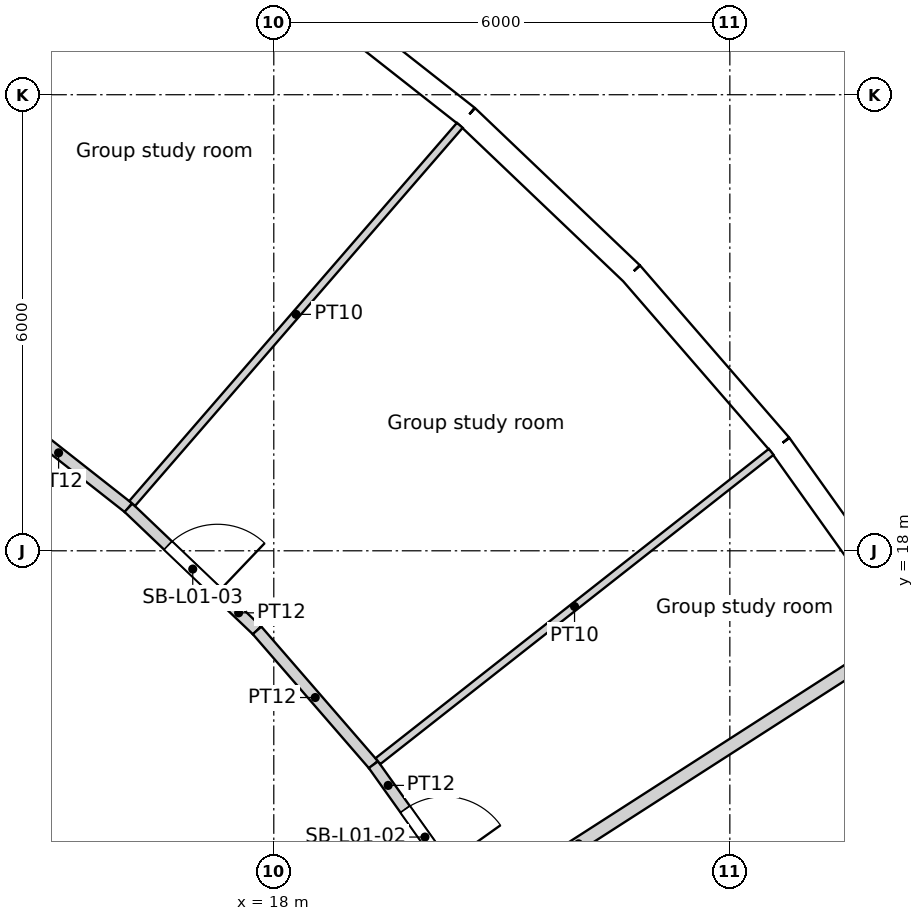
"""IFC4 building model, lengths in metres.
Left out: names, types, materials, properties, quantities, classifications, styles, units other than length and angle.
Written with IfcOpenShell. Run it as: python <this file> out.ifc"""

import sys

from ifc_helpers import new_model, si_unit, direction, frame, frame_2d, origin, origin_2d, place, context, subcontext, project, spatial, rectangle, circle, extrude, element, fill, save


model = new_model("IFC4")
c1 = context("Model", 3, precision=1e-05, world=origin(), true_north=direction((0.0, 1.0)))
c2 = subcontext(c1, "Body", "Model", "MODEL_VIEW")
j1 = project(units=[si_unit("LENGTHUNIT", "METRE"), si_unit("PLANEANGLEUNIT", "RADIAN")], contexts=[c1])
p1 = place(None, origin())
s1 = spatial("IfcSite", under=j1, at=p1, CompositionType="ELEMENT")
p2 = place(p1, origin())
s2 = spatial("IfcBuilding", under=s1, at=p2, CompositionType="ELEMENT")
p3 = place(p2, frame((0.0, 0.0, 9.0)))
s3 = spatial("IfcBuildingStorey", under=s2, at=p3, CompositionType="ELEMENT", Elevation=9.0)
for number, where, z_axis, x_axis in (
    (1, (25.469, 16.368, 0.0), (0.0, 0.0, 1.0), (1.0, 0.0, 0.0)),
    (2, (21.911, 20.892, 0.0), (0.0, 0.0, 1.0), (1.0, 0.0, 0.0)),
    (3, (17.561, 24.661, 0.0), (0.0, 0.0, 1.0), (1.0, 0.0, 0.0)),
):
    element("IfcColumn", number, at=place(p3, frame(where, z_axis=z_axis, x_axis=x_axis)), inside=s3, PredefinedType="COLUMN", context=c2, shape_type="SweptSolid", body=[
        extrude(circle(Radius=0.7, at=origin_2d()), origin(), (0.0, 0.0, 1.0), 4.8),
    ])
for number, where, z_axis, x_axis in (
    (4, (18.805, 15.779, 0.0), (0.0, 0.0, 1.0), (1.0, 0.0, 0.0)),
    (5, (14.659, 19.69, 0.0), (0.0, 0.0, 1.0), (1.0, 0.0, 0.0)),
):
    element("IfcColumn", number, at=place(p3, frame(where, z_axis=z_axis, x_axis=x_axis)), inside=s3, PredefinedType="COLUMN", context=c2, shape_type="SweptSolid", body=[
        extrude(circle(Radius=0.75, at=origin_2d()), origin(), (0.0, 0.0, 1.0), 4.8),
    ])
p4 = place(p3, frame((26.394, 16.962, 0.0), z_axis=(0.0, 0.0, 1.0), x_axis=(-0.580100533892, 0.814544885551, 0.0)))
e6 = element("IfcWall", 6, at=p4, inside=s3, PredefinedType="SOLIDWALL", context=c2, shape_type="SweptSolid", body=[
    extrude(rectangle(XDim=2.986, YDim=0.3, at=frame_2d((1.493, 0.0))), origin(), (0.0, 0.0, 1.0), 4.35),
])
p5 = place(p4, frame((1.493, 0.0, 2.0)))
e7 = element("IfcOpeningElement", 7, at=p5, cuts=e6, PredefinedType="OPENING", context=c2, shape_type="SweptSolid", body=[
    extrude(circle(Radius=1.2, at=origin_2d()), frame((0.0, 0.16, 0.0), z_axis=(0.0, -1.0, 0.0), x_axis=(1.0, 0.0, 0.0)), (0.0, 0.0, 1.0), 0.32),
])
p6 = place(p3, frame((24.662, 19.394, 0.0), z_axis=(0.0, 0.0, 1.0), x_axis=(-0.654809121128, 0.755794294029, 0.0)))
e8 = element("IfcWall", 8, at=p6, inside=s3, PredefinedType="SOLIDWALL", context=c2, shape_type="SweptSolid", body=[
    extrude(rectangle(XDim=2.986, YDim=0.3, at=frame_2d((1.493, 0.0))), origin(), (0.0, 0.0, 1.0), 4.35),
])
p7 = place(p6, frame((1.493, 0.0, 2.0)))
e9 = element("IfcOpeningElement", 9, at=p7, cuts=e8, PredefinedType="OPENING", context=c2, shape_type="SweptSolid", body=[
    extrude(circle(Radius=1.2, at=origin_2d()), frame((0.0, 0.16, 0.0), z_axis=(0.0, -1.0, 0.0), x_axis=(1.0, 0.0, 0.0)), (0.0, 0.0, 1.0), 0.32),
])
p8 = place(p3, frame((22.707, 21.651, 0.0), z_axis=(0.0, 0.0, 1.0), x_axis=(-0.723750841228, 0.690061388444, 0.0)))
e10 = element("IfcWall", 10, at=p8, inside=s3, PredefinedType="SOLIDWALL", context=c2, shape_type="SweptSolid", body=[
    extrude(rectangle(XDim=2.986, YDim=0.3, at=frame_2d((1.493, 0.0))), origin(), (0.0, 0.0, 1.0), 4.35),
])
p9 = place(p8, frame((1.493, 0.0, 2.0)))
e11 = element("IfcOpeningElement", 11, at=p9, cuts=e10, PredefinedType="OPENING", context=c2, shape_type="SweptSolid", body=[
    extrude(circle(Radius=1.2, at=origin_2d()), frame((0.0, 0.16, 0.0), z_axis=(0.0, -1.0, 0.0), x_axis=(1.0, 0.0, 0.0)), (0.0, 0.0, 1.0), 0.32),
])
p10 = place(p3, frame((20.546, 23.711, 0.0), z_axis=(0.0, 0.0, 1.0), x_axis=(-0.786043032847, 0.618171780747, 0.0)))
e12 = element("IfcWall", 12, at=p10, inside=s3, PredefinedType="SOLIDWALL", context=c2, shape_type="SweptSolid", body=[
    extrude(rectangle(XDim=2.986, YDim=0.3, at=frame_2d((1.493, 0.0))), origin(), (0.0, 0.0, 1.0), 4.35),
])
p11 = place(p10, frame((1.493, 0.0, 2.0)))
e13 = element("IfcOpeningElement", 13, at=p11, cuts=e12, PredefinedType="OPENING", context=c2, shape_type="SweptSolid", body=[
    extrude(circle(Radius=1.2, at=origin_2d()), frame((0.0, 0.16, 0.0), z_axis=(0.0, -1.0, 0.0), x_axis=(1.0, 0.0, 0.0)), (0.0, 0.0, 1.0), 0.32),
])
p12 = place(p3, frame((15.612, 27.041, 0.0), z_axis=(0.0, 0.0, 1.0), x_axis=(-0.499994104079, -0.866028807769, 0.0)))
e14 = element("IfcWall", 14, at=p12, inside=s3, PredefinedType="PARTITIONING", context=c2, shape_type="SweptSolid", body=[
    extrude(rectangle(XDim=4.305, YDim=0.1, at=frame_2d((2.152, 0.0))), origin(), (0.0, 0.0, 1.0), 3.75),
])
p13 = place(p3, frame((16.088, 18.566, 0.0), z_axis=(0.0, 0.0, 1.0), x_axis=(-0.786108126536, 0.618089001191, 0.0)))
e15 = element("IfcWall", 15, at=p13, inside=s3, PredefinedType="PARTITIONING", context=c2, shape_type="SweptSolid", body=[
    extrude(rectangle(XDim=2.338, YDim=0.15, at=frame_2d((1.169, 0.0))), origin(), (0.0, 0.0, 1.0), 3.75),
])
p14 = place(p3, frame((16.088, 18.566, 0.0), z_axis=(0.0, 0.0, 1.0), x_axis=(0.723668407542, -0.690147836283, 0.0)))
e16 = element("IfcWall", 16, at=p14, inside=s3, PredefinedType="PARTITIONING", context=c2, shape_type="SweptSolid", body=[
    extrude(rectangle(XDim=2.338, YDim=0.15, at=frame_2d((1.169, 0.0))), origin(), (0.0, 0.0, 1.0), 3.75),
])
p15 = place(p14, frame((0.719, 0.0, 0.0)))
e17 = element("IfcOpeningElement", 17, at=p15, cuts=e16, PredefinedType="OPENING", context=c2, shape_type="SweptSolid", body=[
    extrude(rectangle(XDim=0.9, YDim=2.1, at=frame_2d((0.45, 1.05))), frame((0.0, 0.075, 0.0), z_axis=(0.0, -1.0, 0.0), x_axis=(1.0, 0.0, 0.0)), (0.0, 0.0, 1.0), 0.15),
])
p16 = place(p3, frame((19.311, 15.186, 0.0), z_axis=(0.0, 0.0, 1.0), x_axis=(-0.654866925236, 0.755744209526, 0.0)))
e18 = element("IfcWall", 18, at=p16, inside=s3, PredefinedType="PARTITIONING", context=c2, shape_type="SweptSolid", body=[
    extrude(rectangle(XDim=2.338, YDim=0.15, at=frame_2d((1.169, 0.0))), origin(), (0.0, 0.0, 1.0), 3.75),
])
p17 = place(p3, frame((20.448, 23.598, 0.0), z_axis=(0.0, 0.0, 1.0), x_axis=(-0.654862756926, -0.755747821427, 0.0)))
e19 = element("IfcWall", 19, at=p17, inside=s3, PredefinedType="PARTITIONING", context=c2, shape_type="SweptSolid", body=[
    extrude(rectangle(XDim=6.582, YDim=0.1, at=frame_2d((3.291, 0.0))), origin(), (0.0, 0.0, 1.0), 3.75),
])
p18 = place(p3, frame((19.311, 15.186, 0.0), z_axis=(0.0, 0.0, 1.0), x_axis=(0.580046101142, -0.81458364859, 0.0)))
e20 = element("IfcWall", 20, at=p18, inside=s3, PredefinedType="PARTITIONING", context=c2, shape_type="SweptSolid", body=[
    extrude(rectangle(XDim=2.249, YDim=0.15, at=frame_2d((1.124, 0.0))), origin(), (0.0, 0.0, 1.0), 3.75),
])
p19 = place(p18, frame((0.719, 0.0, 0.0)))
e21 = element("IfcOpeningElement", 21, at=p19, cuts=e20, PredefinedType="OPENING", context=c2, shape_type="SweptSolid", body=[
    extrude(rectangle(XDim=0.9, YDim=2.1, at=frame_2d((0.45, 1.05))), frame((0.0, 0.075, 0.0), z_axis=(0.0, -1.0, 0.0), x_axis=(1.0, 0.0, 0.0)), (0.0, 0.0, 1.0), 0.15),
])
p20 = place(p3, frame((24.544, 19.302, 0.0), z_axis=(0.0, 0.0, 1.0), x_axis=(-0.786055722677, -0.618155644515, 0.0)))
e22 = element("IfcWall", 22, at=p20, inside=s3, PredefinedType="PARTITIONING", context=c2, shape_type="SweptSolid", body=[
    extrude(rectangle(XDim=6.583, YDim=0.1, at=frame_2d((3.291, 0.0))), origin(), (0.0, 0.0, 1.0), 3.75),
])
p21 = place(p3, frame((26.268, 16.881, 0.0), z_axis=(0.0, 0.0, 1.0), x_axis=(-0.841249776377, -0.540646662568, 0.0)))
e23 = element("IfcWall", 23, at=p21, inside=s3, PredefinedType="PARTITIONING", context=c2, shape_type="SweptSolid", body=[
    extrude(rectangle(XDim=10.123, YDim=0.175, at=frame_2d((5.062, 0.0))), origin(), (0.0, 0.0, 1.0), 3.75),
])
p22 = place(p5, origin())
e24 = element("IfcWindow", 24, at=p22, inside=s3, PartitioningType="SINGLE_PANEL", PredefinedType="WINDOW", context=c2, shape_type="SweptSolid", body=[
    extrude(circle(Radius=1.2, at=origin_2d()), frame((0.0, 0.12, 0.0), z_axis=(0.0, -1.0, 0.0), x_axis=(1.0, 0.0, 0.0)), (0.0, 0.0, 1.0), 0.1),
])
fill(e7, e24)
p23 = place(p7, origin())
e25 = element("IfcWindow", 25, at=p23, inside=s3, PartitioningType="SINGLE_PANEL", PredefinedType="WINDOW", context=c2, shape_type="SweptSolid", body=[
    extrude(circle(Radius=1.2, at=origin_2d()), frame((0.0, 0.12, 0.0), z_axis=(0.0, -1.0, 0.0), x_axis=(1.0, 0.0, 0.0)), (0.0, 0.0, 1.0), 0.1),
])
fill(e9, e25)
p24 = place(p9, origin())
e26 = element("IfcWindow", 26, at=p24, inside=s3, PartitioningType="SINGLE_PANEL", PredefinedType="WINDOW", context=c2, shape_type="SweptSolid", body=[
    extrude(circle(Radius=1.2, at=origin_2d()), frame((0.0, 0.12, 0.0), z_axis=(0.0, -1.0, 0.0), x_axis=(1.0, 0.0, 0.0)), (0.0, 0.0, 1.0), 0.1),
])
fill(e11, e26)
p25 = place(p11, origin())
e27 = element("IfcWindow", 27, at=p25, inside=s3, PartitioningType="SINGLE_PANEL", PredefinedType="WINDOW", context=c2, shape_type="SweptSolid", body=[
    extrude(circle(Radius=1.2, at=origin_2d()), frame((0.0, 0.12, 0.0), z_axis=(0.0, -1.0, 0.0), x_axis=(1.0, 0.0, 0.0)), (0.0, 0.0, 1.0), 0.1),
])
fill(e13, e27)
p26 = place(p19, origin())
e28 = element("IfcDoor", 28, at=p26, inside=s3, OperationType="SINGLE_SWING_RIGHT", PredefinedType="DOOR", context=c2, shape_type="SweptSolid", body=[
    extrude(rectangle(XDim=0.9, YDim=2.1, at=frame_2d((0.45, 1.05))), frame((0.0, 0.025, 0.0), z_axis=(0.0, -1.0, 0.0), x_axis=(1.0, 0.0, 0.0)), (0.0, 0.0, 1.0), 0.05),
])
fill(e21, e28)
p27 = place(p15, origin())
e29 = element("IfcDoor", 29, at=p27, inside=s3, OperationType="SINGLE_SWING_RIGHT", PredefinedType="DOOR", context=c2, shape_type="SweptSolid", body=[
    extrude(rectangle(XDim=0.9, YDim=2.1, at=frame_2d((0.45, 1.05))), frame((0.0, 0.025, 0.0), z_axis=(0.0, -1.0, 0.0), x_axis=(1.0, 0.0, 0.0)), (0.0, 0.0, 1.0), 0.05),
])
fill(e17, e29)
save(model, sys.argv[1])
